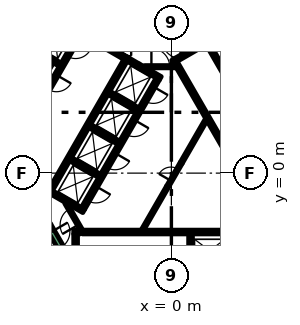
"""IFC4 building model, lengths in metres.
Left out: names, types, materials, properties, quantities, classifications, styles, units other than length and angle.
Written with IfcOpenShell. Run it as: python <this file> out.ifc"""

import sys

from ifc_helpers import new_model, si_unit, direction, frame, frame_2d, origin, place, context, subcontext, project, spatial, polyline, rectangle, outline, extrude, element, fill, save


model = new_model("IFC4")
c1 = context("Model", 3, precision=1e-05, world=origin(), true_north=direction((0.0, 1.0)))
c2 = subcontext(c1, "Body", "Model", "MODEL_VIEW")
j1 = project(units=[si_unit("LENGTHUNIT", "METRE"), si_unit("PLANEANGLEUNIT", "RADIAN")], contexts=[c1])
p1 = place(None, origin())
s1 = spatial("IfcSite", under=j1, at=p1, CompositionType="ELEMENT")
p2 = place(p1, origin())
s2 = spatial("IfcBuilding", under=s1, at=p2, CompositionType="ELEMENT")
p3 = place(p2, origin())
s3 = spatial("IfcBuildingStorey", under=s2, at=p3, CompositionType="ELEMENT", Elevation=0.0)
p4 = place(p3, frame((-15.36, -1.503, -1.8), z_axis=(0.0, 0.0, 1.0), x_axis=(0.50000389221, 0.866023156604, 0.0)))
e1 = element("IfcWall", 1, at=p4, inside=s3, PredefinedType="SOLIDWALL", context=c2, shape_type="SweptSolid", body=[
    extrude(rectangle(XDim=21.0, YDim=0.9, at=frame_2d((10.5, 0.0))), origin(), (0.0, 0.0, 1.0), 7.8),
])
p5 = place(p3, frame((-5.845, -3.875, -1.8), z_axis=(0.0, 0.0, 1.0), x_axis=(1.0, 0.0, 0.0)))
e2 = element("IfcWall", 2, at=p5, inside=s3, PredefinedType="SOLIDWALL", context=c2, shape_type="SweptSolid", body=[
    extrude(rectangle(XDim=12.27, YDim=0.25, at=frame_2d((6.135, 0.0))), origin(), (0.0, 0.0, 1.0), 7.8),
])
p6 = place(p3, frame((-6.425, -3.875, -1.8), z_axis=(0.0, 0.0, 1.0), x_axis=(1.0, 0.0, 0.0)))
e3 = element("IfcWall", 3, at=p6, inside=s3, PredefinedType="SOLIDWALL", context=c2, shape_type="SweptSolid", body=[
    extrude(rectangle(XDim=0.428, YDim=0.25, at=frame_2d((0.214, 0.0))), origin(), (0.0, 0.0, 1.0), 7.8),
])
p7 = place(p3, frame((1.26, -4.0, -1.8), z_axis=(0.0, 0.0, 1.0), x_axis=(0.0, -1.0, 0.0)))
e4 = element("IfcWall", 4, at=p7, inside=s3, PredefinedType="SOLIDWALL", context=c2, shape_type="SweptSolid", body=[
    extrude(rectangle(XDim=2.2, YDim=0.25, at=frame_2d((1.1, 0.0))), origin(), (0.0, 0.0, 1.0), 7.8),
])
p8 = place(p3, frame((-6.3, -4.0, -1.8), z_axis=(0.0, 0.0, 1.0), x_axis=(0.0, -1.0, 0.0)))
e5 = element("IfcWall", 5, at=p8, inside=s3, PredefinedType="SOLIDWALL", context=c2, shape_type="SweptSolid", body=[
    extrude(rectangle(XDim=3.154, YDim=0.25, at=frame_2d((1.577, 0.0))), origin(), (0.0, 0.0, 1.0), 7.8),
])
p9 = place(p3, frame((0.0, 0.0, -1.8)))
e6 = element("IfcWall", 6, at=p9, inside=s3, PredefinedType="SOLIDWALL", context=c2, shape_type="SweptSolid", body=[
    extrude(outline(polyline([(0.335, 6.925), (0.335, 7.075), (0.335, 7.075), (0.335, 7.075), (0.245, 7.075), (0.079, 7.363), (0.035, 7.439), (0.252, 7.564), (0.377, 7.348), (6.552, -3.348), (6.677, -3.564), (6.46, -3.689), (4.897, -0.981), (0.332, 6.925), (0.335, 6.925), (0.335, 6.925), (0.335, 6.925)])), origin(), (0.0, 0.0, 1.0), 7.8),
])
p10 = place(p3, frame((0.314, 7.456, -1.8), z_axis=(0.0, 0.0, 1.0), x_axis=(0.866013897511, 0.50001992892, 0.0)))
e7 = element("IfcWall", 7, at=p10, inside=s3, PredefinedType="SOLIDWALL", context=c2, shape_type="SweptSolid", body=[
    extrude(rectangle(XDim=3.268, YDim=0.25, at=frame_2d((1.634, 0.0))), origin(), (0.0, 0.0, 1.0), 7.8),
])
p11 = place(p3, frame((-8.06, -1.311, -1.8), z_axis=(0.0, 0.0, 1.0), x_axis=(0.50000273126, 0.866023826885, 0.0)))
e8 = element("IfcWall", 8, at=p11, inside=s3, PredefinedType="SOLIDWALL", context=c2, shape_type="SweptSolid", body=[
    extrude(rectangle(XDim=10.33, YDim=0.25, at=frame_2d((5.165, 0.0))), origin(), (0.0, 0.0, 1.0), 7.8),
])
p12 = place(p3, frame((-1.819, 6.87, -1.8), z_axis=(0.0, 0.0, 1.0), x_axis=(-0.866294599386, 0.499533449405, 0.0)))
e9 = element("IfcWall", 9, at=p12, inside=s3, PredefinedType="SOLIDWALL", context=c2, shape_type="SweptSolid", body=[
    extrude(rectangle(XDim=0.41, YDim=0.25, at=frame_2d((0.205, 0.0))), origin(), (0.0, 0.0, 1.0), 7.8),
])
p13 = place(p3, frame((-2.849, 7.465, -1.8), z_axis=(0.0, 0.0, 1.0), x_axis=(0.865955664968, -0.500120771724, 0.0)))
e10 = element("IfcWall", 10, at=p13, inside=s3, PredefinedType="SOLIDWALL", context=c2, shape_type="SweptSolid", body=[
    extrude(rectangle(XDim=0.778, YDim=0.25, at=frame_2d((0.389, 0.0))), origin(), (0.0, 0.0, 1.0), 7.8),
])
p14 = place(p3, frame((-0.728, 6.24, -1.8), z_axis=(0.0, 0.0, 1.0), x_axis=(-0.866002680491, 0.500039355833, 0.0)))
e11 = element("IfcWall", 11, at=p14, inside=s3, PredefinedType="SOLIDWALL", context=c2, shape_type="SweptSolid", body=[
    extrude(rectangle(XDim=1.178, YDim=0.25, at=frame_2d((0.589, 0.0))), origin(), (0.0, 0.0, 1.0), 7.8),
])
for number, where, z_axis, x_axis in (
    (12, (-2.204, 4.182, -1.8), (0.0, 0.0, 1.0), (-0.866, 0.5, 0.0)),
    (13, (-5.369, 3.1, -1.8), (0.0, 0.0, 1.0), (0.866, -0.5, 0.0)),
    (14, (-4.724, -0.182, -1.8), (0.0, 0.0, 1.0), (-0.866, 0.5, 0.0)),
):
    element("IfcWall", number, at=place(p3, frame(where, z_axis=z_axis, x_axis=x_axis)), inside=s3, PredefinedType="SOLIDWALL", context=c2, shape_type="SweptSolid", body=[
        extrude(rectangle(XDim=2.2, YDim=0.25, at=frame_2d((1.1, 0.0))), origin(), (0.0, 0.0, 1.0), 7.8),
    ])
e15 = element("IfcWall", 15, at=p9, inside=s3, PredefinedType="SOLIDWALL", context=c2, shape_type="SweptSolid", body=[
    extrude(outline(polyline([(-5.922, -2.257), (-5.922, -2.257), (-5.705, -2.382), (-5.83, -2.598), (-6.829, -2.021), (-6.88, -1.934), (-6.88, -1.934), (-6.93, -1.963), (-7.952, -1.373), (-7.827, -1.156), (-5.922, -2.257)])), origin(), (0.0, 0.0, 1.0), 7.8),
])
e16 = element("IfcWall", 16, at=p9, inside=s3, PredefinedType="SOLIDWALL", context=c2, shape_type="SweptSolid", body=[
    extrude(outline(polyline([(-3.128, 7.481), (-3.259, 7.557), (-3.134, 7.773), (-3.003, 7.698), (-3.128, 7.481)])), origin(), (0.0, 0.0, 1.0), 7.8),
])
p15 = place(p3, frame((-7.314, 7.132, -1.8), z_axis=(0.0, 0.0, 1.0), x_axis=(-0.866008176907, 0.50002983664, 0.0)))
e17 = element("IfcWall", 17, at=p15, inside=s3, PredefinedType="SOLIDWALL", context=c2, shape_type="SweptSolid", body=[
    extrude(rectangle(XDim=2.2, YDim=0.25, at=frame_2d((1.1, 0.0))), origin(), (0.0, 0.0, 1.0), 7.8),
])
for number, where, z_axis, x_axis in (
    (18, (-1.887, -3.718, 0.0), (0.0, 0.0, 1.0), (0.5, 0.866, 0.0)),
    (19, (0.645, 0.667, 0.0), (0.0, 0.0, 1.0), (0.5, 0.866, 0.0)),
):
    element("IfcWall", number, at=place(p3, frame(where, z_axis=z_axis, x_axis=x_axis)), inside=s3, PredefinedType="PARTITIONING", context=c2, shape_type="SweptSolid", body=[
        extrude(rectangle(XDim=3.263, YDim=0.15, at=frame_2d((1.632, 0.0))), origin(), (0.0, 0.0, 1.0), 5.1),
    ])
p16 = place(p3, frame((8.565, -2.185, -1.8), z_axis=(0.0, 0.0, 1.0), x_axis=(-0.499997954832, 0.866026584559, 0.0)))
e20 = element("IfcWall", 20, at=p16, inside=s3, PredefinedType="SOLIDWALL", context=c2, shape_type="SweptSolid", body=[
    extrude(rectangle(XDim=12.35, YDim=0.25, at=frame_2d((6.175, 0.0))), origin(), (0.0, 0.0, 1.0), 7.8),
])
p17 = place(p16, frame((5.725, 0.0, 1.8)))
e21 = element("IfcOpeningElement", 21, at=p17, cuts=e20, PredefinedType="OPENING", context=c2, shape_type="SweptSolid", body=[
    extrude(rectangle(XDim=0.9, YDim=2.1, at=frame_2d((0.45, 1.05))), frame((0.0, 0.135, 0.0), z_axis=(0.0, -1.0, 0.0), x_axis=(1.0, 0.0, 0.0)), (0.0, 0.0, 1.0), 0.27),
])
p18 = place(p3, frame((-6.008, 9.144, -1.8), z_axis=(0.0, 0.0, 1.0), x_axis=(-0.500006956611, -0.866021387346, 0.0)))
e22 = element("IfcWall", 22, at=p18, inside=s3, PredefinedType="SOLIDWALL", context=c2, shape_type="SweptSolid", body=[
    extrude(rectangle(XDim=9.83, YDim=0.25, at=frame_2d((4.915, 0.0))), origin(), (0.0, 0.0, 1.0), 7.8),
])
p19 = place(p18, frame((0.585, 0.0, 1.8)))
e23 = element("IfcOpeningElement", 23, at=p19, cuts=e22, PredefinedType="OPENING", context=c2, shape_type="SweptSolid", body=[
    extrude(rectangle(XDim=1.1, YDim=2.1, at=frame_2d((0.55, 1.05))), frame((0.0, 0.135, 0.0), z_axis=(0.0, -1.0, 0.0), x_axis=(1.0, 0.0, 0.0)), (0.0, 0.0, 1.0), 0.27),
])
p20 = place(p18, frame((3.105, 0.0, 1.8)))
e24 = element("IfcOpeningElement", 24, at=p20, cuts=e22, PredefinedType="OPENING", context=c2, shape_type="SweptSolid", body=[
    extrude(rectangle(XDim=1.1, YDim=2.1, at=frame_2d((0.55, 1.05))), frame((0.0, 0.135, 0.0), z_axis=(0.0, -1.0, 0.0), x_axis=(1.0, 0.0, 0.0)), (0.0, 0.0, 1.0), 0.27),
])
p21 = place(p18, frame((6.985, 0.0, 1.8)))
e25 = element("IfcOpeningElement", 25, at=p21, cuts=e22, PredefinedType="OPENING", context=c2, shape_type="SweptSolid", body=[
    extrude(rectangle(XDim=0.9, YDim=2.1, at=frame_2d((0.45, 1.05))), frame((0.0, 0.135, 0.0), z_axis=(0.0, -1.0, 0.0), x_axis=(1.0, 0.0, 0.0)), (0.0, 0.0, 1.0), 0.27),
])
p22 = place(p3, frame((-0.898, 6.194, -1.8), z_axis=(0.0, 0.0, 1.0), x_axis=(-0.499996202215, -0.866027596426, 0.0)))
e26 = element("IfcWall", 26, at=p22, inside=s3, PredefinedType="SOLIDWALL", context=c2, shape_type="SweptSolid", body=[
    extrude(rectangle(XDim=9.83, YDim=0.25, at=frame_2d((4.915, 0.0))), origin(), (0.0, 0.0, 1.0), 7.8),
])
p23 = place(p22, frame((0.585, 0.0, 1.8)))
e27 = element("IfcOpeningElement", 27, at=p23, cuts=e26, PredefinedType="OPENING", context=c2, shape_type="SweptSolid", body=[
    extrude(rectangle(XDim=1.1, YDim=2.1, at=frame_2d((0.55, 1.05))), frame((0.0, 0.135, 0.0), z_axis=(0.0, -1.0, 0.0), x_axis=(1.0, 0.0, 0.0)), (0.0, 0.0, 1.0), 0.27),
])
p24 = place(p22, frame((3.105, 0.0, 1.8)))
e28 = element("IfcOpeningElement", 28, at=p24, cuts=e26, PredefinedType="OPENING", context=c2, shape_type="SweptSolid", body=[
    extrude(rectangle(XDim=1.1, YDim=2.1, at=frame_2d((0.55, 1.05))), frame((0.0, 0.135, 0.0), z_axis=(0.0, -1.0, 0.0), x_axis=(1.0, 0.0, 0.0)), (0.0, 0.0, 1.0), 0.27),
])
p25 = place(p22, frame((5.625, 0.0, 1.8)))
e29 = element("IfcOpeningElement", 29, at=p25, cuts=e26, PredefinedType="OPENING", context=c2, shape_type="SweptSolid", body=[
    extrude(rectangle(XDim=1.1, YDim=2.1, at=frame_2d((0.55, 1.05))), frame((0.0, 0.135, 0.0), z_axis=(0.0, -1.0, 0.0), x_axis=(1.0, 0.0, 0.0)), (0.0, 0.0, 1.0), 0.27),
])
p26 = place(p22, frame((8.145, 0.0, 1.8)))
e30 = element("IfcOpeningElement", 30, at=p26, cuts=e26, PredefinedType="OPENING", context=c2, shape_type="SweptSolid", body=[
    extrude(rectangle(XDim=1.1, YDim=2.1, at=frame_2d((0.55, 1.05))), frame((0.0, 0.135, 0.0), z_axis=(0.0, -1.0, 0.0), x_axis=(1.0, 0.0, 0.0)), (0.0, 0.0, 1.0), 0.27),
])
p27 = place(p3, frame((-8.103, -3.466, 0.0), z_axis=(0.0, 0.0, 1.0), x_axis=(0.500078061341, -0.865980330357, 0.0)))
e31 = element("IfcWall", 31, at=p27, inside=s3, PredefinedType="SOLIDWALL", context=c2, shape_type="SweptSolid", body=[
    extrude(rectangle(XDim=2.1, YDim=0.4, at=frame_2d((1.05, 0.0))), origin(), (0.0, 0.0, 1.0), 6.0),
])
p28 = place(p27, frame((0.45, 0.0, 0.0)))
e32 = element("IfcOpeningElement", 32, at=p28, cuts=e31, PredefinedType="OPENING", context=c2, shape_type="SweptSolid", body=[
    extrude(rectangle(XDim=1.2, YDim=2.1, at=frame_2d((0.6, 1.05))), frame((0.0, 0.21, 0.0), z_axis=(0.0, -1.0, 0.0), x_axis=(1.0, 0.0, 0.0)), (0.0, 0.0, 1.0), 0.42),
])
p29 = place(p3, frame((-1.765, 7.0, 0.0), z_axis=(0.0, 0.0, 1.0), x_axis=(1.0, 0.0, 0.0)))
e33 = element("IfcWall", 33, at=p29, inside=s3, PredefinedType="PARTITIONING", context=c2, shape_type="SweptSolid", body=[
    extrude(rectangle(XDim=2.1, YDim=0.15, at=frame_2d((1.05, 0.0))), origin(), (0.0, 0.0, 1.0), 5.1),
])
p30 = place(p29, frame((0.45, 0.0, 0.0)))
e34 = element("IfcOpeningElement", 34, at=p30, cuts=e33, PredefinedType="OPENING", context=c2, shape_type="SweptSolid", body=[
    extrude(rectangle(XDim=1.2, YDim=2.1, at=frame_2d((0.6, 1.05))), frame((0.0, 0.085, 0.0), z_axis=(0.0, -1.0, 0.0), x_axis=(1.0, 0.0, 0.0)), (0.0, 0.0, 1.0), 0.17),
])
p31 = place(p3, frame((-5.895, -3.79, 0.0), z_axis=(0.0, 0.0, 1.0), x_axis=(-0.49994051562, 0.866059744384, 0.0)))
e35 = element("IfcWall", 35, at=p31, inside=s3, PredefinedType="PARTITIONING", context=c2, shape_type="SweptSolid", body=[
    extrude(rectangle(XDim=2.1, YDim=0.15, at=frame_2d((1.05, 0.0))), origin(), (0.0, 0.0, 1.0), 5.1),
])
p32 = place(p31, frame((0.45, 0.0, 0.0)))
e36 = element("IfcOpeningElement", 36, at=p32, cuts=e35, PredefinedType="OPENING", context=c2, shape_type="SweptSolid", body=[
    extrude(rectangle(XDim=1.2, YDim=2.1, at=frame_2d((0.6, 1.05))), frame((0.0, 0.085, 0.0), z_axis=(0.0, -1.0, 0.0), x_axis=(1.0, 0.0, 0.0)), (0.0, 0.0, 1.0), 0.17),
])
p33 = place(p3, frame((-4.409, 8.365, -1.8), z_axis=(0.0, 0.0, 1.0), x_axis=(0.866034573852, -0.49998411664, 0.0)))
e37 = element("IfcWall", 37, at=p33, inside=s3, PredefinedType="SOLIDWALL", context=c2, shape_type="SweptSolid", body=[
    extrude(rectangle(XDim=1.4, YDim=0.25, at=frame_2d((0.7, 0.0))), origin(), (0.0, 0.0, 1.0), 7.8),
])
p34 = place(p33, frame((0.1, 0.0, 1.8)))
e38 = element("IfcOpeningElement", 38, at=p34, cuts=e37, PredefinedType="OPENING", context=c2, shape_type="SweptSolid", body=[
    extrude(rectangle(XDim=1.2, YDim=2.1, at=frame_2d((0.6, 1.05))), frame((0.0, 0.135, 0.0), z_axis=(0.0, -1.0, 0.0), x_axis=(1.0, 0.0, 0.0)), (0.0, 0.0, 1.0), 0.27),
])
p35 = place(p3, frame((-0.255, -0.892, 0.0), z_axis=(0.0, 0.0, 1.0), x_axis=(0.500062916607, 0.865989075817, 0.0)))
e39 = element("IfcWall", 39, at=p35, inside=s3, PredefinedType="PARTITIONING", context=c2, shape_type="SweptSolid", body=[
    extrude(rectangle(XDim=1.8, YDim=0.15, at=frame_2d((0.9, 0.0))), origin(), (0.0, 0.0, 1.0), 5.1),
])
p36 = place(p35, frame((0.45, 0.0, 0.0)))
e40 = element("IfcOpeningElement", 40, at=p36, cuts=e39, PredefinedType="OPENING", context=c2, shape_type="SweptSolid", body=[
    extrude(rectangle(XDim=0.9, YDim=2.1, at=frame_2d((0.45, 1.05))), frame((0.0, 0.085, 0.0), z_axis=(0.0, -1.0, 0.0), x_axis=(1.0, 0.0, 0.0)), (0.0, 0.0, 1.0), 0.17),
])
p37 = place(p19, origin())
e41 = element("IfcDoor", 41, at=p37, inside=s3, OperationType="DOUBLE_DOOR_SLIDING", PredefinedType="DOOR", context=c2, shape_type="SweptSolid", body=[
    extrude(rectangle(XDim=1.1, YDim=2.1, at=frame_2d((0.55, 1.05))), frame((0.0, 0.025, 0.0), z_axis=(0.0, -1.0, 0.0), x_axis=(1.0, 0.0, 0.0)), (0.0, 0.0, 1.0), 0.05),
])
fill(e23, e41)
p38 = place(p20, origin())
e42 = element("IfcDoor", 42, at=p38, inside=s3, OperationType="DOUBLE_DOOR_SLIDING", PredefinedType="DOOR", context=c2, shape_type="SweptSolid", body=[
    extrude(rectangle(XDim=1.1, YDim=2.1, at=frame_2d((0.55, 1.05))), frame((0.0, 0.025, 0.0), z_axis=(0.0, -1.0, 0.0), x_axis=(1.0, 0.0, 0.0)), (0.0, 0.0, 1.0), 0.05),
])
fill(e24, e42)
p39 = place(p23, origin())
e43 = element("IfcDoor", 43, at=p39, inside=s3, OperationType="DOUBLE_DOOR_SLIDING", PredefinedType="DOOR", context=c2, shape_type="SweptSolid", body=[
    extrude(rectangle(XDim=1.1, YDim=2.1, at=frame_2d((0.55, 1.05))), frame((0.0, 0.025, 0.0), z_axis=(0.0, -1.0, 0.0), x_axis=(1.0, 0.0, 0.0)), (0.0, 0.0, 1.0), 0.05),
])
fill(e27, e43)
p40 = place(p24, origin())
e44 = element("IfcDoor", 44, at=p40, inside=s3, OperationType="DOUBLE_DOOR_SLIDING", PredefinedType="DOOR", context=c2, shape_type="SweptSolid", body=[
    extrude(rectangle(XDim=1.1, YDim=2.1, at=frame_2d((0.55, 1.05))), frame((0.0, 0.025, 0.0), z_axis=(0.0, -1.0, 0.0), x_axis=(1.0, 0.0, 0.0)), (0.0, 0.0, 1.0), 0.05),
])
fill(e28, e44)
p41 = place(p25, origin())
e45 = element("IfcDoor", 45, at=p41, inside=s3, OperationType="DOUBLE_DOOR_SLIDING", PredefinedType="DOOR", context=c2, shape_type="SweptSolid", body=[
    extrude(rectangle(XDim=1.1, YDim=2.1, at=frame_2d((0.55, 1.05))), frame((0.0, 0.025, 0.0), z_axis=(0.0, -1.0, 0.0), x_axis=(1.0, 0.0, 0.0)), (0.0, 0.0, 1.0), 0.05),
])
fill(e29, e45)
p42 = place(p26, origin())
e46 = element("IfcDoor", 46, at=p42, inside=s3, OperationType="DOUBLE_DOOR_SLIDING", PredefinedType="DOOR", context=c2, shape_type="SweptSolid", body=[
    extrude(rectangle(XDim=1.1, YDim=2.1, at=frame_2d((0.55, 1.05))), frame((0.0, 0.025, 0.0), z_axis=(0.0, -1.0, 0.0), x_axis=(1.0, 0.0, 0.0)), (0.0, 0.0, 1.0), 0.05),
])
fill(e30, e46)
p43 = place(p28, origin())
e47 = element("IfcDoor", 47, at=p43, inside=s3, OperationType="SINGLE_SWING_LEFT", PredefinedType="DOOR", context=c2, shape_type="SweptSolid", body=[
    extrude(rectangle(XDim=1.2, YDim=2.1, at=frame_2d((0.6, 1.05))), frame((0.0, 0.025, 0.0), z_axis=(0.0, -1.0, 0.0), x_axis=(1.0, 0.0, 0.0)), (0.0, 0.0, 1.0), 0.05),
])
fill(e32, e47)
p44 = place(p30, origin())
e48 = element("IfcDoor", 48, at=p44, inside=s3, OperationType="SINGLE_SWING_LEFT", PredefinedType="DOOR", context=c2, shape_type="SweptSolid", body=[
    extrude(rectangle(XDim=1.2, YDim=2.1, at=frame_2d((0.6, 1.05))), frame((0.0, 0.025, 0.0), z_axis=(0.0, -1.0, 0.0), x_axis=(1.0, 0.0, 0.0)), (0.0, 0.0, 1.0), 0.05),
])
fill(e34, e48)
p45 = place(p32, origin())
e49 = element("IfcDoor", 49, at=p45, inside=s3, OperationType="SINGLE_SWING_LEFT", PredefinedType="DOOR", context=c2, shape_type="SweptSolid", body=[
    extrude(rectangle(XDim=1.2, YDim=2.1, at=frame_2d((0.6, 1.05))), frame((0.0, 0.025, 0.0), z_axis=(0.0, -1.0, 0.0), x_axis=(1.0, 0.0, 0.0)), (0.0, 0.0, 1.0), 0.05),
])
fill(e36, e49)
p46 = place(p34, origin())
e50 = element("IfcDoor", 50, at=p46, inside=s3, OperationType="SINGLE_SWING_LEFT", PredefinedType="DOOR", context=c2, shape_type="SweptSolid", body=[
    extrude(rectangle(XDim=1.2, YDim=2.1, at=frame_2d((0.6, 1.05))), frame((0.0, 0.025, 0.0), z_axis=(0.0, -1.0, 0.0), x_axis=(1.0, 0.0, 0.0)), (0.0, 0.0, 1.0), 0.05),
])
fill(e38, e50)
p47 = place(p36, origin())
e51 = element("IfcDoor", 51, at=p47, inside=s3, OperationType="SINGLE_SWING_LEFT", PredefinedType="DOOR", context=c2, shape_type="SweptSolid", body=[
    extrude(rectangle(XDim=0.9, YDim=2.1, at=frame_2d((0.45, 1.05))), frame((0.0, 0.025, 0.0), z_axis=(0.0, -1.0, 0.0), x_axis=(1.0, 0.0, 0.0)), (0.0, 0.0, 1.0), 0.05),
])
fill(e40, e51)
save(model, sys.argv[1])
